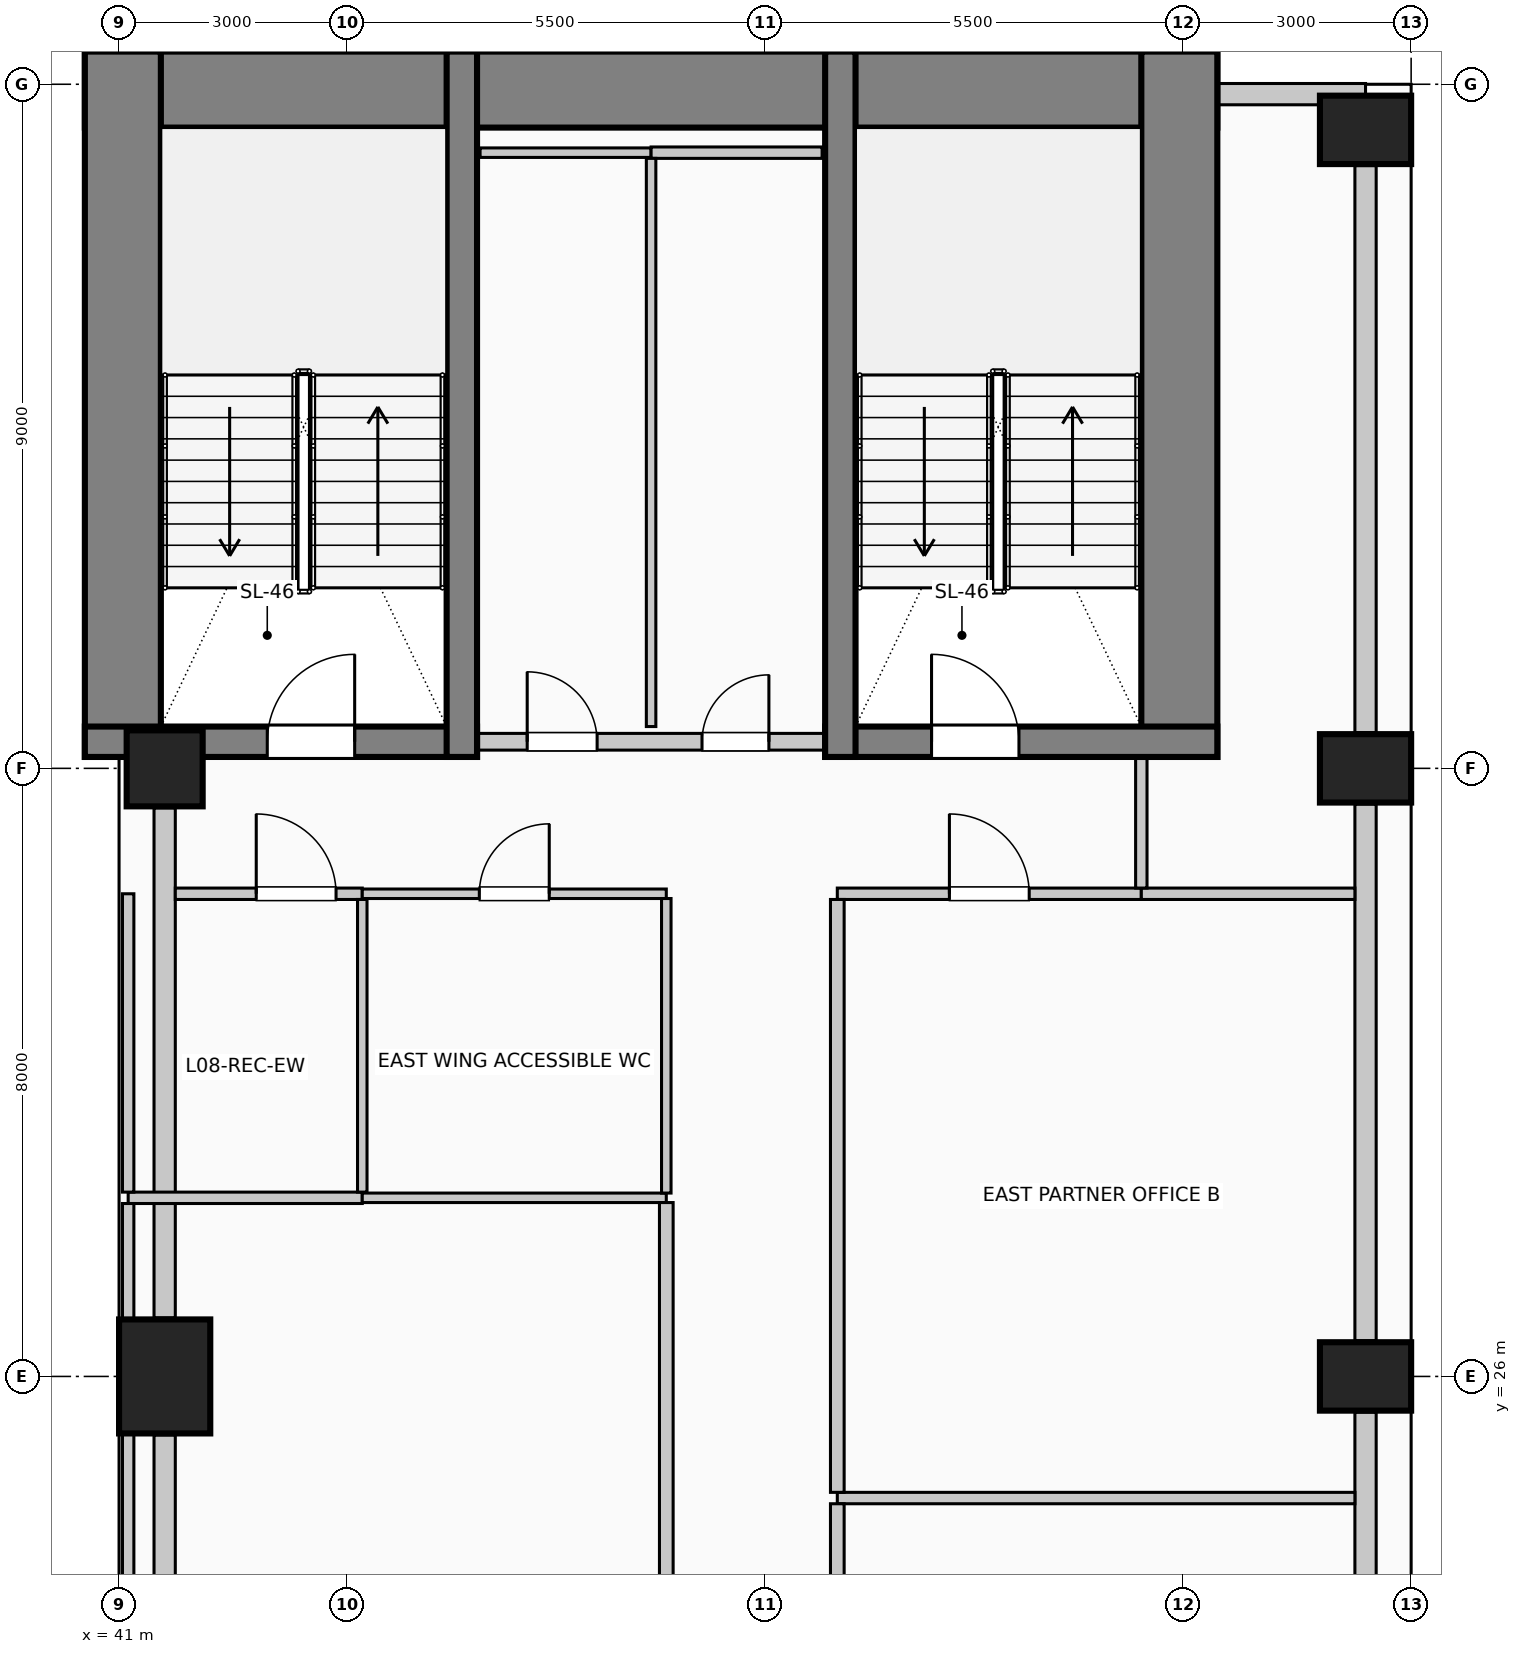
"""IFC4 building model, lengths in metres.
Left out: names, types, materials, properties, quantities, classifications, styles, units other than length and angle.
Written with IfcOpenShell. Run it as: python <this file> out.ifc"""

import sys

from ifc_helpers import new_model, si_unit, direction, frame, frame_2d, origin, origin_2d, place, context, subcontext, project, spatial, rectangle, circle, extrude, element, fill, save


model = new_model("IFC4")
c1 = context("Model", 3, precision=1e-05, world=origin(), true_north=direction((0.0, 1.0)))
c2 = subcontext(c1, "Body", "Model", "MODEL_VIEW")
j1 = project(units=[si_unit("LENGTHUNIT", "METRE"), si_unit("PLANEANGLEUNIT", "RADIAN")], contexts=[c1])
p1 = place(None, origin())
s1 = spatial("IfcSite", under=j1, at=p1, CompositionType="ELEMENT")
p2 = place(p1, origin())
s2 = spatial("IfcBuilding", under=s1, at=p2, CompositionType="ELEMENT")
p3 = place(p2, frame((0.0, 0.0, 34.6)))
s3 = spatial("IfcBuildingStorey", under=s2, at=p3, CompositionType="ELEMENT", Elevation=34.6)
p4 = place(p3, frame((40.55, 42.93, 0.0), z_axis=(0.0, 0.0, 1.0), x_axis=(1.0, 0.0, 0.0)))
e1 = element("IfcWall", 1, at=p4, inside=s3, PredefinedType="SHEAR", context=c2, shape_type="SweptSolid", body=[
    extrude(rectangle(XDim=14.9, YDim=1.0, at=frame_2d((7.45, 0.0))), origin(), (0.0, 0.0, 1.0), 4.0),
])
for number, where, z_axis, x_axis in (
    (2, (41.05, 34.15, 0.0), (0.0, 0.0, 1.0), (0.0, 1.0, 0.0)),
    (3, (54.95, 34.15, 0.0), (0.0, 0.0, 1.0), (0.0, 1.0, 0.0)),
):
    element("IfcWall", number, at=place(p3, frame(where, z_axis=z_axis, x_axis=x_axis)), inside=s3, PredefinedType="SHEAR", context=c2, shape_type="SweptSolid", body=[
        extrude(rectangle(XDim=9.28, YDim=1.0, at=frame_2d((4.64, 0.0))), origin(), (0.0, 0.0, 1.0), 4.0),
    ])
p5 = place(p3, frame((40.55, 34.35, 0.0), z_axis=(0.0, 0.0, 1.0), x_axis=(1.0, 0.0, 0.0)))
e4 = element("IfcWall", 4, at=p5, inside=s3, PredefinedType="SHEAR", context=c2, shape_type="SweptSolid", body=[
    extrude(rectangle(XDim=5.16, YDim=0.4, at=frame_2d((2.58, 0.0))), origin(), (0.0, 0.0, 1.0), 4.0),
])
p6 = place(p5, frame((2.4, 0.0, 0.0)))
e5 = element("IfcOpeningElement", 5, at=p6, cuts=e4, PredefinedType="OPENING", context=c2, shape_type="SweptSolid", body=[
    extrude(rectangle(XDim=1.15, YDim=2.2, at=frame_2d((0.575, 1.1))), frame((0.0, 0.21, 0.0), z_axis=(0.0, -1.0, 0.0), x_axis=(1.0, 0.0, 0.0)), (0.0, 0.0, 1.0), 0.42),
])
p7 = place(p3, frame((45.51, 34.15, 0.0), z_axis=(0.0, 0.0, 1.0), x_axis=(0.0, 1.0, 0.0)))
e6 = element("IfcWall", 6, at=p7, inside=s3, PredefinedType="SHEAR", context=c2, shape_type="SweptSolid", body=[
    extrude(rectangle(XDim=9.28, YDim=0.4, at=frame_2d((4.64, 0.0))), origin(), (0.0, 0.0, 1.0), 4.0),
])
p8 = place(p3, frame((50.29, 34.35, 0.0), z_axis=(0.0, 0.0, 1.0), x_axis=(1.0, 0.0, 0.0)))
e7 = element("IfcWall", 7, at=p8, inside=s3, PredefinedType="SHEAR", context=c2, shape_type="SweptSolid", body=[
    extrude(rectangle(XDim=5.16, YDim=0.4, at=frame_2d((2.58, 0.0))), origin(), (0.0, 0.0, 1.0), 4.0),
])
p9 = place(p8, frame((1.4, 0.0, 0.0)))
e8 = element("IfcOpeningElement", 8, at=p9, cuts=e7, PredefinedType="OPENING", context=c2, shape_type="SweptSolid", body=[
    extrude(rectangle(XDim=1.15, YDim=2.2, at=frame_2d((0.575, 1.1))), frame((0.0, 0.21, 0.0), z_axis=(0.0, -1.0, 0.0), x_axis=(1.0, 0.0, 0.0)), (0.0, 0.0, 1.0), 0.42),
])
p10 = place(p3, frame((50.49, 34.15, 0.0), z_axis=(0.0, 0.0, 1.0), x_axis=(0.0, 1.0, 0.0)))
e9 = element("IfcWall", 9, at=p10, inside=s3, PredefinedType="SHEAR", context=c2, shape_type="SweptSolid", body=[
    extrude(rectangle(XDim=9.28, YDim=0.4, at=frame_2d((4.64, 0.0))), origin(), (0.0, 0.0, 1.0), 4.0),
])
for number, where, z_axis, x_axis in (
    (10, (57.4, 26.0, 0.0), (0.0, 0.0, 1.0), (0.0, 1.0, 0.0)),
    (11, (57.4, 34.0, 0.0), (0.0, 0.0, 1.0), (0.0, 1.0, 0.0)),
    (12, (57.4, 42.4, 0.0), (0.0, 0.0, 1.0), (0.0, 1.0, 0.0)),
):
    element("IfcColumn", number, at=place(p3, frame(where, z_axis=z_axis, x_axis=x_axis)), inside=s3, PredefinedType="COLUMN", context=c2, shape_type="SweptSolid", body=[
        extrude(rectangle(XDim=0.9, YDim=1.2, at=origin_2d()), origin(), (0.0, 0.0, 1.0), 4.0),
    ])
p11 = place(p3, frame((41.6, 26.0, 0.0), z_axis=(0.0, 0.0, 1.0), x_axis=(1.0, 0.0, 0.0)))
e13 = element("IfcColumn", 13, at=p11, inside=s3, PredefinedType="COLUMN", context=c2, shape_type="SweptSolid", body=[
    extrude(rectangle(XDim=1.2, YDim=1.5, at=origin_2d()), origin(), (0.0, 0.0, 1.0), 4.0),
])
p12 = place(p3, frame((41.6, 34.0, 0.0), z_axis=(0.0, 0.0, 1.0), x_axis=(1.0, 0.0, 0.0)))
e14 = element("IfcColumn", 14, at=p12, inside=s3, PredefinedType="COLUMN", context=c2, shape_type="SweptSolid", body=[
    extrude(circle(Radius=0.5, at=origin_2d()), origin(), (0.0, 0.0, 1.0), 4.0),
])
for number, where, z_axis, x_axis in (
    (15, (57.4, 25.53, 0.0), (0.0, 0.0, 1.0), (0.0, -1.0, 0.0)),
    (16, (57.4, 33.53, 0.0), (0.0, 0.0, 1.0), (0.0, -1.0, 0.0)),
):
    element("IfcWall", number, at=place(p3, frame(where, z_axis=z_axis, x_axis=x_axis)), inside=s3, PredefinedType="SOLIDWALL", context=c2, shape_type="SweptSolid", body=[
        extrude(rectangle(XDim=7.06, YDim=0.28, at=frame_2d((3.53, 0.0))), origin(), (0.0, 0.0, 1.0), 2.85),
    ])
p13 = place(p3, frame((57.4, 41.93, 0.0), z_axis=(0.0, 0.0, 1.0), x_axis=(0.0, -1.0, 0.0)))
e17 = element("IfcWall", 17, at=p13, inside=s3, PredefinedType="SOLIDWALL", context=c2, shape_type="SweptSolid", body=[
    extrude(rectangle(XDim=7.46, YDim=0.28, at=frame_2d((3.73, 0.0))), origin(), (0.0, 0.0, 1.0), 2.85),
])
p14 = place(p3, frame((55.455, 42.87, 0.0), z_axis=(0.0, 0.0, 1.0), x_axis=(1.0, 0.0, 0.0)))
e18 = element("IfcWall", 18, at=p14, inside=s3, PredefinedType="SOLIDWALL", context=c2, shape_type="SweptSolid", body=[
    extrude(rectangle(XDim=1.945, YDim=0.28, at=frame_2d((0.972, 0.0))), origin(), (0.0, 0.0, 1.0), 3.7),
])
p15 = place(p3, frame((41.6, 18.77, 0.0), z_axis=(0.0, 0.0, 1.0), x_axis=(0.0, 1.0, 0.0)))
e19 = element("IfcWall", 19, at=p15, inside=s3, PredefinedType="SOLIDWALL", context=c2, shape_type="SweptSolid", body=[
    extrude(rectangle(XDim=6.46, YDim=0.28, at=frame_2d((3.23, 0.0))), origin(), (0.0, 0.0, 1.0), 3.0),
])
p16 = place(p3, frame((41.6, 26.77, 0.0), z_axis=(0.0, 0.0, 1.0), x_axis=(0.0, 1.0, 0.0)))
e20 = element("IfcWall", 20, at=p16, inside=s3, PredefinedType="SOLIDWALL", context=c2, shape_type="SweptSolid", body=[
    extrude(rectangle(XDim=6.71, YDim=0.28, at=frame_2d((3.355, 0.0))), origin(), (0.0, 0.0, 1.0), 3.0),
])
p17 = place(p3, frame((45.72, 34.35, 0.0), z_axis=(0.0, 0.0, 1.0), x_axis=(1.0, 0.0, 0.0)))
e21 = element("IfcWall", 21, at=p17, inside=s3, PredefinedType="PARTITIONING", context=c2, shape_type="SweptSolid", body=[
    extrude(rectangle(XDim=4.56, YDim=0.22, at=frame_2d((2.28, 0.0))), origin(), (0.0, 0.0, 1.0), 3.7),
])
p18 = place(p17, frame((0.65, 0.0, 0.0)))
e22 = element("IfcOpeningElement", 22, at=p18, cuts=e21, PredefinedType="OPENING", context=c2, shape_type="SweptSolid", body=[
    extrude(rectangle(XDim=0.92, YDim=2.1, at=frame_2d((0.46, 1.05))), frame((0.0, 0.12, 0.0), z_axis=(0.0, -1.0, 0.0), x_axis=(1.0, 0.0, 0.0)), (0.0, 0.0, 1.0), 0.24),
])
p19 = place(p17, frame((2.95, 0.0, 0.0)))
e23 = element("IfcOpeningElement", 23, at=p19, cuts=e21, PredefinedType="OPENING", context=c2, shape_type="SweptSolid", body=[
    extrude(rectangle(XDim=0.88, YDim=2.1, at=frame_2d((0.44, 1.05))), frame((0.0, 0.12, 0.0), z_axis=(0.0, -1.0, 0.0), x_axis=(1.0, 0.0, 0.0)), (0.0, 0.0, 1.0), 0.24),
])
p20 = place(p3, frame((50.45, 24.4, 0.0), z_axis=(0.0, 0.0, 1.0), x_axis=(1.0, 0.0, 0.0)))
e24 = element("IfcWall", 24, at=p20, inside=s3, PredefinedType="PARTITIONING", context=c2, shape_type="SweptSolid", body=[
    extrude(rectangle(XDim=6.81, YDim=0.15, at=frame_2d((3.405, 0.0))), origin(), (0.0, 0.0, 1.0), 3.7),
])
p21 = place(p3, frame((41.12, 28.35, 0.0), z_axis=(0.0, 0.0, 1.0), x_axis=(1.0, 0.0, 0.0)))
e25 = element("IfcWall", 25, at=p21, inside=s3, PredefinedType="PARTITIONING", context=c2, shape_type="SweptSolid", body=[
    extrude(rectangle(XDim=3.08, YDim=0.15, at=frame_2d((1.54, 0.0))), origin(), (0.0, 0.0, 1.0), 3.7),
])
p22 = place(p3, frame((44.2, 28.35, 0.0), z_axis=(0.0, 0.0, 1.0), x_axis=(1.0, 0.0, 0.0)))
e26 = element("IfcWall", 26, at=p22, inside=s3, PredefinedType="PARTITIONING", context=c2, shape_type="SweptSolid", body=[
    extrude(rectangle(XDim=4.0, YDim=0.125, at=frame_2d((2.0, 0.0))), origin(), (0.0, 0.0, 1.0), 3.7),
])
p23 = place(p3, frame((41.74, 32.35, 0.0), z_axis=(0.0, 0.0, 1.0), x_axis=(1.0, 0.0, 0.0)))
e27 = element("IfcWall", 27, at=p23, inside=s3, PredefinedType="PARTITIONING", context=c2, shape_type="SweptSolid", body=[
    extrude(rectangle(XDim=2.46, YDim=0.15, at=frame_2d((1.23, 0.0))), origin(), (0.0, 0.0, 1.0), 3.7),
])
p24 = place(p23, frame((1.065, 0.0, 0.0)))
e28 = element("IfcOpeningElement", 28, at=p24, cuts=e27, PredefinedType="OPENING", context=c2, shape_type="SweptSolid", body=[
    extrude(rectangle(XDim=1.05, YDim=2.15, at=frame_2d((0.525, 1.075))), frame((0.0, 0.085, 0.0), z_axis=(0.0, -1.0, 0.0), x_axis=(1.0, 0.0, 0.0)), (0.0, 0.0, 1.0), 0.17),
])
p25 = place(p3, frame((44.2, 32.35, 0.0), z_axis=(0.0, 0.0, 1.0), x_axis=(1.0, 0.0, 0.0)))
e29 = element("IfcWall", 29, at=p25, inside=s3, PredefinedType="PARTITIONING", context=c2, shape_type="SweptSolid", body=[
    extrude(rectangle(XDim=4.0, YDim=0.125, at=frame_2d((2.0, 0.0))), origin(), (0.0, 0.0, 1.0), 3.7),
])
p26 = place(p25, frame((1.54, 0.0, 0.0)))
e30 = element("IfcOpeningElement", 30, at=p26, cuts=e29, PredefinedType="OPENING", context=c2, shape_type="SweptSolid", body=[
    extrude(rectangle(XDim=0.92, YDim=2.1, at=frame_2d((0.46, 1.05))), frame((0.0, 0.073, 0.0), z_axis=(0.0, -1.0, 0.0), x_axis=(1.0, 0.0, 0.0)), (0.0, 0.0, 1.0), 0.145),
])
p27 = place(p3, frame((50.45, 32.35, 0.0), z_axis=(0.0, 0.0, 1.0), x_axis=(1.0, 0.0, 0.0)))
e31 = element("IfcWall", 31, at=p27, inside=s3, PredefinedType="PARTITIONING", context=c2, shape_type="SweptSolid", body=[
    extrude(rectangle(XDim=4.0, YDim=0.15, at=frame_2d((2.0, 0.0))), origin(), (0.0, 0.0, 1.0), 3.7),
])
p28 = place(p27, frame((1.475, 0.0, 0.0)))
e32 = element("IfcOpeningElement", 32, at=p28, cuts=e31, PredefinedType="OPENING", context=c2, shape_type="SweptSolid", body=[
    extrude(rectangle(XDim=1.05, YDim=2.15, at=frame_2d((0.525, 1.075))), frame((0.0, 0.085, 0.0), z_axis=(0.0, -1.0, 0.0), x_axis=(1.0, 0.0, 0.0)), (0.0, 0.0, 1.0), 0.17),
])
p29 = place(p3, frame((54.45, 32.35, 0.0), z_axis=(0.0, 0.0, 1.0), x_axis=(1.0, 0.0, 0.0)))
e33 = element("IfcWall", 33, at=p29, inside=s3, PredefinedType="PARTITIONING", context=c2, shape_type="SweptSolid", body=[
    extrude(rectangle(XDim=2.81, YDim=0.15, at=frame_2d((1.405, 0.0))), origin(), (0.0, 0.0, 1.0), 3.7),
])
p30 = place(p3, frame((45.75, 42.1, 0.0), z_axis=(0.0, 0.0, 1.0), x_axis=(1.0, 0.0, 0.0)))
e34 = element("IfcWall", 34, at=p30, inside=s3, PredefinedType="PARTITIONING", context=c2, shape_type="SweptSolid", body=[
    extrude(rectangle(XDim=2.25, YDim=0.125, at=frame_2d((1.125, 0.0))), origin(), (0.0, 0.0, 1.0), 3.7),
])
p31 = place(p3, frame((48.0, 42.1, 0.0), z_axis=(0.0, 0.0, 1.0), x_axis=(1.0, 0.0, 0.0)))
e35 = element("IfcWall", 35, at=p31, inside=s3, PredefinedType="PARTITIONING", context=c2, shape_type="SweptSolid", body=[
    extrude(rectangle(XDim=2.25, YDim=0.15, at=frame_2d((1.125, 0.0))), origin(), (0.0, 0.0, 1.0), 3.7),
])
p32 = place(p3, frame((41.12, 18.75, 0.0), z_axis=(0.0, 0.0, 1.0), x_axis=(0.0, 1.0, 0.0)))
e36 = element("IfcWall", 36, at=p32, inside=s3, PredefinedType="PARTITIONING", context=c2, shape_type="SweptSolid", body=[
    extrude(rectangle(XDim=6.5, YDim=0.15, at=frame_2d((3.25, 0.0))), origin(), (0.0, 0.0, 1.0), 3.7),
])
p33 = place(p3, frame((41.12, 26.75, 0.0), z_axis=(0.0, 0.0, 1.0), x_axis=(0.0, 1.0, 0.0)))
e37 = element("IfcWall", 37, at=p33, inside=s3, PredefinedType="PARTITIONING", context=c2, shape_type="SweptSolid", body=[
    extrude(rectangle(XDim=1.525, YDim=0.15, at=frame_2d((0.762, 0.0))), origin(), (0.0, 0.0, 1.0), 3.7),
])
p34 = place(p3, frame((41.12, 28.425, 0.0), z_axis=(0.0, 0.0, 1.0), x_axis=(0.0, 1.0, 0.0)))
e38 = element("IfcWall", 38, at=p34, inside=s3, PredefinedType="PARTITIONING", context=c2, shape_type="SweptSolid", body=[
    extrude(rectangle(XDim=3.925, YDim=0.15, at=frame_2d((1.962, 0.0))), origin(), (0.0, 0.0, 1.0), 3.7),
])
p35 = place(p3, frame((44.2, 28.425, 0.0), z_axis=(0.0, 0.0, 1.0), x_axis=(0.0, 1.0, 0.0)))
e39 = element("IfcWall", 39, at=p35, inside=s3, PredefinedType="PARTITIONING", context=c2, shape_type="SweptSolid", body=[
    extrude(rectangle(XDim=3.85, YDim=0.125, at=frame_2d((1.925, 0.0))), origin(), (0.0, 0.0, 1.0), 3.7),
])
p36 = place(p3, frame((48.0, 34.55, 0.0), z_axis=(0.0, 0.0, 1.0), x_axis=(0.0, 1.0, 0.0)))
e40 = element("IfcWall", 40, at=p36, inside=s3, PredefinedType="PARTITIONING", context=c2, shape_type="SweptSolid", body=[
    extrude(rectangle(XDim=7.475, YDim=0.125, at=frame_2d((3.737, 0.0))), origin(), (0.0, 0.0, 1.0), 3.7),
])
p37 = place(p3, frame((48.2, 15.875, 0.0), z_axis=(0.0, 0.0, 1.0), x_axis=(0.0, 1.0, 0.0)))
e41 = element("IfcWall", 41, at=p37, inside=s3, PredefinedType="PARTITIONING", context=c2, shape_type="SweptSolid", body=[
    extrude(rectangle(XDim=12.413, YDim=0.18, at=frame_2d((6.206, 0.0))), origin(), (0.0, 0.0, 1.0), 3.7),
])
p38 = place(p37, frame((5.731, 0.0, 0.0)))
e42 = element("IfcOpeningElement", 42, at=p38, cuts=e41, PredefinedType="OPENING", context=c2, shape_type="SweptSolid", body=[
    extrude(rectangle(XDim=0.95, YDim=2.15, at=frame_2d((0.475, 1.075))), frame((0.0, 0.1, 0.0), z_axis=(0.0, -1.0, 0.0), x_axis=(1.0, 0.0, 0.0)), (0.0, 0.0, 1.0), 0.2),
])
p39 = place(p3, frame((48.2, 28.413, 0.0), z_axis=(0.0, 0.0, 1.0), x_axis=(0.0, 1.0, 0.0)))
e43 = element("IfcWall", 43, at=p39, inside=s3, PredefinedType="PARTITIONING", context=c2, shape_type="SweptSolid", body=[
    extrude(rectangle(XDim=3.875, YDim=0.125, at=frame_2d((1.938, 0.0))), origin(), (0.0, 0.0, 1.0), 3.7),
])
p40 = place(p3, frame((50.45, 16.475, 0.0), z_axis=(0.0, 0.0, 1.0), x_axis=(0.0, 1.0, 0.0)))
e44 = element("IfcWall", 44, at=p40, inside=s3, PredefinedType="PARTITIONING", context=c2, shape_type="SweptSolid", body=[
    extrude(rectangle(XDim=7.85, YDim=0.18, at=frame_2d((3.925, 0.0))), origin(), (0.0, 0.0, 1.0), 3.7),
])
p41 = place(p40, frame((3.4, 0.0, 0.0)))
e45 = element("IfcOpeningElement", 45, at=p41, cuts=e44, PredefinedType="OPENING", context=c2, shape_type="SweptSolid", body=[
    extrude(rectangle(XDim=1.05, YDim=2.15, at=frame_2d((0.525, 1.075))), frame((0.0, 0.1, 0.0), z_axis=(0.0, -1.0, 0.0), x_axis=(1.0, 0.0, 0.0)), (0.0, 0.0, 1.0), 0.2),
])
p42 = place(p3, frame((50.45, 24.475, 0.0), z_axis=(0.0, 0.0, 1.0), x_axis=(0.0, 1.0, 0.0)))
e46 = element("IfcWall", 46, at=p42, inside=s3, PredefinedType="PARTITIONING", context=c2, shape_type="SweptSolid", body=[
    extrude(rectangle(XDim=7.8, YDim=0.18, at=frame_2d((3.9, 0.0))), origin(), (0.0, 0.0, 1.0), 3.7),
])
p43 = place(p3, frame((54.45, 32.425, 0.0), z_axis=(0.0, 0.0, 1.0), x_axis=(0.0, 1.0, 0.0)))
e47 = element("IfcWall", 47, at=p43, inside=s3, PredefinedType="PARTITIONING", context=c2, shape_type="SweptSolid", body=[
    extrude(rectangle(XDim=1.725, YDim=0.15, at=frame_2d((0.862, 0.0))), origin(), (0.0, 0.0, 1.0), 3.7),
])
p44 = place(p6, origin())
e48 = element("IfcDoor", 48, at=p44, inside=s3, OperationType="SINGLE_SWING_RIGHT", PredefinedType="DOOR", context=c2, shape_type="SweptSolid", body=[
    extrude(rectangle(XDim=1.15, YDim=2.2, at=frame_2d((0.575, 1.1))), frame((0.0, 0.025, 0.0), z_axis=(0.0, -1.0, 0.0), x_axis=(1.0, 0.0, 0.0)), (0.0, 0.0, 1.0), 0.05),
])
fill(e5, e48)
p45 = place(p18, origin())
e49 = element("IfcDoor", 49, at=p45, inside=s3, OperationType="SINGLE_SWING_LEFT", PredefinedType="DOOR", context=c2, shape_type="SweptSolid", body=[
    extrude(rectangle(XDim=0.92, YDim=2.1, at=frame_2d((0.46, 1.05))), frame((0.0, 0.025, 0.0), z_axis=(0.0, -1.0, 0.0), x_axis=(1.0, 0.0, 0.0)), (0.0, 0.0, 1.0), 0.05),
])
fill(e22, e49)
p46 = place(p19, origin())
e50 = element("IfcDoor", 50, at=p46, inside=s3, OperationType="SINGLE_SWING_RIGHT", PredefinedType="DOOR", context=c2, shape_type="SweptSolid", body=[
    extrude(rectangle(XDim=0.88, YDim=2.1, at=frame_2d((0.44, 1.05))), frame((0.0, 0.025, 0.0), z_axis=(0.0, -1.0, 0.0), x_axis=(1.0, 0.0, 0.0)), (0.0, 0.0, 1.0), 0.05),
])
fill(e23, e50)
p47 = place(p9, origin())
e51 = element("IfcDoor", 51, at=p47, inside=s3, OperationType="SINGLE_SWING_LEFT", PredefinedType="DOOR", context=c2, shape_type="SweptSolid", body=[
    extrude(rectangle(XDim=1.15, YDim=2.2, at=frame_2d((0.575, 1.1))), frame((0.0, 0.025, 0.0), z_axis=(0.0, -1.0, 0.0), x_axis=(1.0, 0.0, 0.0)), (0.0, 0.0, 1.0), 0.05),
])
fill(e8, e51)
p48 = place(p24, origin())
e52 = element("IfcDoor", 52, at=p48, inside=s3, OperationType="SINGLE_SWING_LEFT", PredefinedType="DOOR", context=c2, shape_type="SweptSolid", body=[
    extrude(rectangle(XDim=1.05, YDim=2.15, at=frame_2d((0.525, 1.075))), frame((0.0, 0.025, 0.0), z_axis=(0.0, -1.0, 0.0), x_axis=(1.0, 0.0, 0.0)), (0.0, 0.0, 1.0), 0.05),
])
fill(e28, e52)
p49 = place(p26, origin())
e53 = element("IfcDoor", 53, at=p49, inside=s3, OperationType="SINGLE_SWING_RIGHT", PredefinedType="DOOR", context=c2, shape_type="SweptSolid", body=[
    extrude(rectangle(XDim=0.92, YDim=2.1, at=frame_2d((0.46, 1.05))), frame((0.0, 0.025, 0.0), z_axis=(0.0, -1.0, 0.0), x_axis=(1.0, 0.0, 0.0)), (0.0, 0.0, 1.0), 0.05),
])
fill(e30, e53)
p50 = place(p28, origin())
e54 = element("IfcDoor", 54, at=p50, inside=s3, OperationType="SINGLE_SWING_LEFT", PredefinedType="DOOR", context=c2, shape_type="SweptSolid", body=[
    extrude(rectangle(XDim=1.05, YDim=2.15, at=frame_2d((0.525, 1.075))), frame((0.0, 0.025, 0.0), z_axis=(0.0, -1.0, 0.0), x_axis=(1.0, 0.0, 0.0)), (0.0, 0.0, 1.0), 0.05),
])
fill(e32, e54)
save(model, sys.argv[1])
